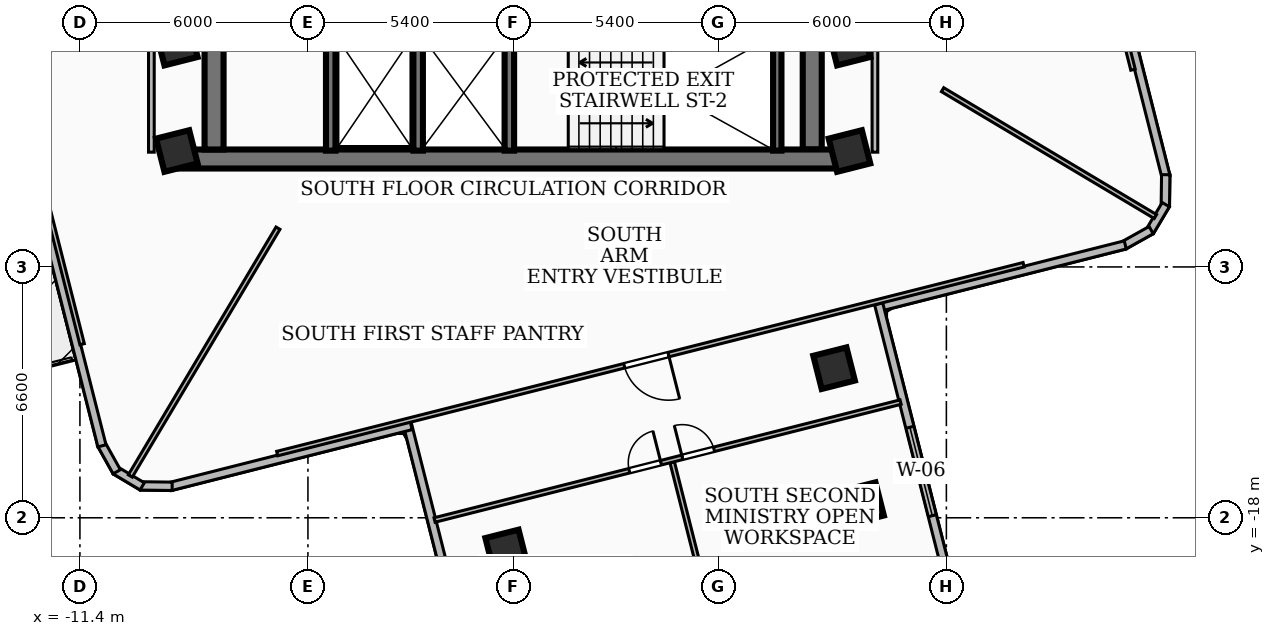
"""IFC4 building model, lengths in metres.
Left out: names, types, materials, properties, quantities, classifications, styles, units other than length and angle.
Written with IfcOpenShell. Run it as: python <this file> out.ifc"""

import sys

from ifc_helpers import new_model, si_unit, direction, frame, frame_2d, origin, origin_2d, place, context, subcontext, project, spatial, rectangle, extrude, element, fill, save


model = new_model("IFC4")
c1 = context("Model", 3, precision=1e-05, world=origin(), true_north=direction((0.0, 1.0)))
c2 = subcontext(c1, "Body", "Model", "MODEL_VIEW")
j1 = project(units=[si_unit("LENGTHUNIT", "METRE"), si_unit("PLANEANGLEUNIT", "RADIAN")], contexts=[c1])
p1 = place(None, origin())
s1 = spatial("IfcSite", under=j1, at=p1, CompositionType="ELEMENT")
p2 = place(p1, origin())
s2 = spatial("IfcBuilding", under=s1, at=p2, CompositionType="ELEMENT")
p3 = place(p2, frame((0.0, 0.0, 130.68)))
s3 = spatial("IfcBuildingStorey", under=s2, at=p3, CompositionType="ELEMENT", Elevation=130.68)
p4 = place(p3, frame((8.78, -8.56, 0.0), z_axis=(0.0, 0.0, 1.0), x_axis=(-1.0, 0.0, 0.0)))
e1 = element("IfcWall", 1, at=p4, inside=s3, PredefinedType="SHEAR", context=c2, shape_type="SweptSolid", body=[
    extrude(rectangle(XDim=17.56, YDim=0.5, at=frame_2d((8.78, 0.0))), origin(), (0.0, 0.0, 1.0), 3.32),
])
for number, where, z_axis, x_axis in (
    (2, (-7.87, -8.31, 0.0), (0.0, 0.0, 1.0), (0.0, 1.0, 0.0)),
    (3, (7.87, -2.0, 0.0), (0.0, 0.0, 1.0), (0.0, -1.0, 0.0)),
):
    element("IfcWall", number, at=place(p3, frame(where, z_axis=z_axis, x_axis=x_axis)), inside=s3, PredefinedType="SHEAR", context=c2, shape_type="SweptSolid", body=[
        extrude(rectangle(XDim=6.31, YDim=0.5, at=frame_2d((3.155, 0.0))), origin(), (0.0, 0.0, 1.0), 3.32),
    ])
p5 = place(p3, frame((6.95, -8.34, 0.0), z_axis=(0.0, 0.0, 1.0), x_axis=(0.0, 1.0, 0.0)))
e4 = element("IfcWall", 4, at=p5, inside=s3, PredefinedType="SOLIDWALL", context=c2, shape_type="SweptSolid", body=[
    extrude(rectangle(XDim=3.06, YDim=0.22, at=frame_2d((1.53, 0.0))), origin(), (0.0, 0.0, 1.0), 3.32),
])
for number, where, z_axis, x_axis in (
    (5, (-0.1, -8.34, 0.0), (0.0, 0.0, 1.0), (0.0, 1.0, 0.0)),
    (6, (-2.5, -8.34, 0.0), (0.0, 0.0, 1.0), (0.0, 1.0, 0.0)),
    (7, (-4.8, -8.34, 0.0), (0.0, 0.0, 1.0), (0.0, 1.0, 0.0)),
):
    element("IfcWall", number, at=place(p3, frame(where, z_axis=z_axis, x_axis=x_axis)), inside=s3, PredefinedType="SOLIDWALL", context=c2, shape_type="SweptSolid", body=[
        extrude(rectangle(XDim=3.04, YDim=0.25, at=frame_2d((1.52, 0.0))), origin(), (0.0, 0.0, 1.0), 3.32),
    ])
for number, where, z_axis, x_axis in (
    (8, (-8.85, -5.55, 0.0), (0.0, 0.0, 1.0), (0.969, 0.245, 0.0)),
    (9, (8.85, -5.55, 0.0), (0.0, 0.0, 1.0), (0.969, 0.245, 0.0)),
    (10, (8.85, -8.35, 0.0), (0.0, 0.0, 1.0), (0.969, 0.245, 0.0)),
    (11, (-8.85, -8.35, 0.0), (0.0, 0.0, 1.0), (0.969, 0.245, 0.0)),
    (12, (-0.183, -18.86, 0.0), (0.0, 0.0, 1.0), (0.969, 0.245, 0.0)),
    (13, (8.445, -14.064, 0.0), (0.0, 0.0, 1.0), (0.969, 0.245, 0.0)),
    (14, (9.208, -17.615, 0.0), (0.0, 0.0, 1.0), (0.969, 0.245, 0.0)),
):
    element("IfcColumn", number, at=place(p3, frame(where, z_axis=z_axis, x_axis=x_axis)), inside=s3, PredefinedType="COLUMN", context=c2, shape_type="SweptSolid", body=[
        extrude(rectangle(XDim=0.9, YDim=0.9, at=origin_2d()), origin(), (0.0, 0.0, 1.0), 3.6),
    ])
p6 = place(p3, frame((15.574, -2.684, 0.0), z_axis=(0.0, 0.0, 1.0), x_axis=(0.245346347134, -0.969435490349, 0.0)))
e15 = element("IfcWall", 15, at=p6, inside=s3, PredefinedType="SOLIDWALL", context=c2, shape_type="SweptSolid", body=[
    extrude(rectangle(XDim=6.538, YDim=0.22, at=frame_2d((3.269, 0.0))), origin(), (0.0, 0.0, 1.0), 3.32),
])
p7 = place(p3, frame((17.172, -8.973, 0.0), z_axis=(0.0, 0.0, 1.0), x_axis=(-0.013464821393, -0.999909345183, 0.0)))
e16 = element("IfcWall", 16, at=p7, inside=s3, PredefinedType="SOLIDWALL", context=c2, shape_type="SweptSolid", body=[
    extrude(rectangle(XDim=0.834, YDim=0.22, at=frame_2d((0.417, 0.0))), origin(), (0.0, 0.0, 1.0), 3.32),
])
p8 = place(p3, frame((17.174, -9.761, 0.0), z_axis=(0.0, 0.0, 1.0), x_axis=(-0.512960801038, -0.858412031951, 0.0)))
e17 = element("IfcWall", 17, at=p8, inside=s3, PredefinedType="SOLIDWALL", context=c2, shape_type="SweptSolid", body=[
    extrude(rectangle(XDim=0.819, YDim=0.22, at=frame_2d((0.41, 0.0))), origin(), (0.0, 0.0, 1.0), 3.32),
])
p9 = place(p3, frame((16.789, -10.431, 0.0), z_axis=(0.0, 0.0, 1.0), x_axis=(-0.872870149311, -0.487952561671, 0.0)))
e18 = element("IfcWall", 18, at=p9, inside=s3, PredefinedType="SOLIDWALL", context=c2, shape_type="SweptSolid", body=[
    extrude(rectangle(XDim=0.834, YDim=0.22, at=frame_2d((0.417, 0.0))), origin(), (0.0, 0.0, 1.0), 3.32),
])
p10 = place(p3, frame((16.107, -10.82, 0.0), z_axis=(0.0, 0.0, 1.0), x_axis=(-0.969443674581, -0.245314006561, 0.0)))
e19 = element("IfcWall", 19, at=p10, inside=s3, PredefinedType="SOLIDWALL", context=c2, shape_type="SweptSolid", body=[
    extrude(rectangle(XDim=6.759, YDim=0.22, at=frame_2d((3.379, 0.0))), origin(), (0.0, 0.0, 1.0), 3.32),
])
p11 = place(p3, frame((9.618, -12.371, 0.0), z_axis=(0.0, 0.0, 1.0), x_axis=(0.245401293719, -0.969421582719, 0.0)))
e20 = element("IfcWall", 20, at=p11, inside=s3, PredefinedType="SOLIDWALL", context=c2, shape_type="SweptSolid", body=[
    extrude(rectangle(XDim=9.458, YDim=0.22, at=frame_2d((4.729, 0.0))), origin(), (0.0, 0.0, 1.0), 3.32),
])
p12 = place(p11, frame((3.35, 0.0, 0.85)))
e21 = element("IfcOpeningElement", 21, at=p12, cuts=e20, PredefinedType="OPENING", context=c2, shape_type="SweptSolid", body=[
    extrude(rectangle(XDim=2.4, YDim=1.85, at=frame_2d((1.2, 0.925))), frame((0.0, 0.12, 0.0), z_axis=(0.0, -1.0, 0.0), x_axis=(1.0, 0.0, 0.0)), (0.0, 0.0, 1.0), 0.24),
])
p13 = place(p3, frame((-0.47, -24.68, 0.0), z_axis=(0.0, 0.0, 1.0), x_axis=(-0.245401293719, 0.969421582719, 0.0)))
e22 = element("IfcWall", 22, at=p13, inside=s3, PredefinedType="SOLIDWALL", context=c2, shape_type="SweptSolid", body=[
    extrude(rectangle(XDim=9.458, YDim=0.22, at=frame_2d((4.729, 0.0))), origin(), (0.0, 0.0, 1.0), 2.55),
])
p14 = place(p3, frame((-2.684, -15.574, 0.0), z_axis=(0.0, 0.0, 1.0), x_axis=(-0.969435490349, -0.245346347134, 0.0)))
e23 = element("IfcWall", 23, at=p14, inside=s3, PredefinedType="SOLIDWALL", context=c2, shape_type="SweptSolid", body=[
    extrude(rectangle(XDim=6.538, YDim=0.22, at=frame_2d((3.269, 0.0))), origin(), (0.0, 0.0, 1.0), 2.55),
])
p15 = place(p3, frame((-8.973, -17.172, 0.0), z_axis=(0.0, 0.0, 1.0), x_axis=(-0.999909345183, 0.013464821393, 0.0)))
e24 = element("IfcWall", 24, at=p15, inside=s3, PredefinedType="SOLIDWALL", context=c2, shape_type="SweptSolid", body=[
    extrude(rectangle(XDim=0.834, YDim=0.22, at=frame_2d((0.417, 0.0))), origin(), (0.0, 0.0, 1.0), 3.32),
])
p16 = place(p3, frame((-9.761, -17.174, 0.0), z_axis=(0.0, 0.0, 1.0), x_axis=(-0.858412031951, 0.512960801038, 0.0)))
e25 = element("IfcWall", 25, at=p16, inside=s3, PredefinedType="SOLIDWALL", context=c2, shape_type="SweptSolid", body=[
    extrude(rectangle(XDim=0.819, YDim=0.22, at=frame_2d((0.41, 0.0))), origin(), (0.0, 0.0, 1.0), 3.32),
])
p17 = place(p3, frame((-10.431, -16.789, 0.0), z_axis=(0.0, 0.0, 1.0), x_axis=(-0.487952561671, 0.872870149311, 0.0)))
e26 = element("IfcWall", 26, at=p17, inside=s3, PredefinedType="SOLIDWALL", context=c2, shape_type="SweptSolid", body=[
    extrude(rectangle(XDim=0.834, YDim=0.22, at=frame_2d((0.417, 0.0))), origin(), (0.0, 0.0, 1.0), 3.32),
])
p18 = place(p3, frame((-10.82, -16.107, 0.0), z_axis=(0.0, 0.0, 1.0), x_axis=(-0.245314006561, 0.969443674581, 0.0)))
e27 = element("IfcWall", 27, at=p18, inside=s3, PredefinedType="SOLIDWALL", context=c2, shape_type="SweptSolid", body=[
    extrude(rectangle(XDim=6.759, YDim=0.22, at=frame_2d((3.379, 0.0))), origin(), (0.0, 0.0, 1.0), 3.32),
])
for number, where, z_axis, x_axis in (
    (28, (-9.52, -8.38, 0.0), (0.0, 0.0, 1.0), (0.0, 1.0, 0.0)),
    (29, (9.52, -8.38, 0.0), (0.0, 0.0, 1.0), (0.0, 1.0, 0.0)),
):
    element("IfcWall", number, at=place(p3, frame(where, z_axis=z_axis, x_axis=x_axis)), inside=s3, PredefinedType="PARTITIONING", context=c2, shape_type="SweptSolid", body=[
        extrude(rectangle(XDim=6.63, YDim=0.15, at=frame_2d((3.315, 0.0))), origin(), (0.0, 0.0, 1.0), 2.55),
    ])
p19 = place(p3, frame((-6.188, -10.38, 0.0), z_axis=(0.0, 0.0, 1.0), x_axis=(-0.511972353143, -0.859001926434, 0.0)))
e30 = element("IfcWall", 30, at=p19, inside=s3, PredefinedType="PARTITIONING", context=c2, shape_type="SweptSolid", body=[
    extrude(rectangle(XDim=7.59, YDim=0.12, at=frame_2d((3.795, 0.0))), origin(), (0.0, 0.0, 1.0), 2.55),
])
p20 = place(p3, frame((11.3, -6.736, 0.0), z_axis=(0.0, 0.0, 1.0), x_axis=(0.858979599017, -0.512009812868, 0.0)))
e31 = element("IfcWall", 31, at=p20, inside=s3, PredefinedType="PARTITIONING", context=c2, shape_type="SweptSolid", body=[
    extrude(rectangle(XDim=6.519, YDim=0.12, at=frame_2d((3.26, 0.0))), origin(), (0.0, 0.0, 1.0), 3.32),
])
p21 = place(p3, frame((11.342, 13.433, 0.0), z_axis=(0.0, 0.0, 1.0), x_axis=(0.24525085526, -0.969459652587, 0.0)))
e32 = element("IfcWall", 32, at=p21, inside=s3, PredefinedType="PARTITIONING", context=c2, shape_type="SweptSolid", body=[
    extrude(rectangle(XDim=20.261, YDim=0.12, at=frame_2d((10.13, 0.0))), origin(), (0.0, 0.0, 1.0), 2.55),
])
p22 = place(p21, frame((9.64, 0.0, 0.0)))
e33 = element("IfcOpeningElement", 33, at=p22, cuts=e32, PredefinedType="OPENING", context=c2, shape_type="SweptSolid", body=[
    extrude(rectangle(XDim=1.2, YDim=2.1, at=frame_2d((0.6, 1.05))), frame((0.0, 0.07, 0.0), z_axis=(0.0, -1.0, 0.0), x_axis=(1.0, 0.0, 0.0)), (0.0, 0.0, 1.0), 0.14),
])
p23 = place(p3, frame((-11.342, -13.433, 0.0), z_axis=(0.0, 0.0, 1.0), x_axis=(-0.24525085526, 0.969459652587, 0.0)))
e34 = element("IfcWall", 34, at=p23, inside=s3, PredefinedType="PARTITIONING", context=c2, shape_type="SweptSolid", body=[
    extrude(rectangle(XDim=20.261, YDim=0.12, at=frame_2d((10.13, 0.0))), origin(), (0.0, 0.0, 1.0), 2.55),
])
p24 = place(p23, frame((9.64, 0.0, 0.0)))
e35 = element("IfcOpeningElement", 35, at=p24, cuts=e34, PredefinedType="OPENING", context=c2, shape_type="SweptSolid", body=[
    extrude(rectangle(XDim=1.2, YDim=2.1, at=frame_2d((0.6, 1.05))), frame((0.0, 0.07, 0.0), z_axis=(0.0, -1.0, 0.0), x_axis=(1.0, 0.0, 0.0)), (0.0, 0.0, 1.0), 0.14),
])
p25 = place(p3, frame((13.433, -11.342, 0.0), z_axis=(0.0, 0.0, 1.0), x_axis=(-0.969459652587, -0.24525085526, 0.0)))
e36 = element("IfcWall", 36, at=p25, inside=s3, PredefinedType="PARTITIONING", context=c2, shape_type="SweptSolid", body=[
    extrude(rectangle(XDim=20.261, YDim=0.12, at=frame_2d((10.13, 0.0))), origin(), (0.0, 0.0, 1.0), 2.55),
])
p26 = place(p25, frame((9.64, 0.0, 0.0)))
e37 = element("IfcOpeningElement", 37, at=p26, cuts=e36, PredefinedType="OPENING", context=c2, shape_type="SweptSolid", body=[
    extrude(rectangle(XDim=1.2, YDim=2.1, at=frame_2d((0.6, 1.05))), frame((0.0, 0.07, 0.0), z_axis=(0.0, -1.0, 0.0), x_axis=(1.0, 0.0, 0.0)), (0.0, 0.0, 1.0), 0.14),
])
p27 = place(p3, frame((4.185, -16.539, 0.0), z_axis=(0.0, 0.0, 1.0), x_axis=(0.245296506438, -0.969448102752, 0.0)))
e38 = element("IfcWall", 38, at=p27, inside=s3, PredefinedType="PARTITIONING", context=c2, shape_type="SweptSolid", body=[
    extrude(rectangle(XDim=4.68, YDim=0.12, at=frame_2d((2.34, 0.0))), origin(), (0.0, 0.0, 1.0), 2.7),
])
p28 = place(p3, frame((-2.068, -18.059, 0.0), z_axis=(0.0, 0.0, 1.0), x_axis=(0.969446010802, 0.245304773986, 0.0)))
e39 = element("IfcWall", 39, at=p28, inside=s3, PredefinedType="PARTITIONING", context=c2, shape_type="SweptSolid", body=[
    extrude(rectangle(XDim=12.65, YDim=0.12, at=frame_2d((6.325, 0.0))), origin(), (0.0, 0.0, 1.0), 2.55),
])
p29 = place(p28, frame((5.285, 0.0, 0.0)))
e40 = element("IfcOpeningElement", 40, at=p29, cuts=e39, PredefinedType="OPENING", context=c2, shape_type="SweptSolid", body=[
    extrude(rectangle(XDim=0.86, YDim=2.04, at=frame_2d((0.43, 1.02))), frame((0.0, 0.07, 0.0), z_axis=(0.0, -1.0, 0.0), x_axis=(1.0, 0.0, 0.0)), (0.0, 0.0, 1.0), 0.14),
])
p30 = place(p28, frame((6.725, 0.0, 0.0)))
e41 = element("IfcOpeningElement", 41, at=p30, cuts=e39, PredefinedType="OPENING", context=c2, shape_type="SweptSolid", body=[
    extrude(rectangle(XDim=0.86, YDim=2.04, at=frame_2d((0.43, 1.02))), frame((0.0, 0.07, 0.0), z_axis=(0.0, -1.0, 0.0), x_axis=(1.0, 0.0, 0.0)), (0.0, 0.0, 1.0), 0.14),
])
p31 = place(p12, origin())
e42 = element("IfcWindow", 42, at=p31, inside=s3, PartitioningType="SINGLE_PANEL", PredefinedType="WINDOW", context=c2, shape_type="SweptSolid", body=[
    extrude(rectangle(XDim=2.4, YDim=1.85, at=frame_2d((1.2, 0.925))), frame((0.0, 0.03, 0.0), z_axis=(0.0, -1.0, 0.0), x_axis=(1.0, 0.0, 0.0)), (0.0, 0.0, 1.0), 0.06),
])
fill(e21, e42)
p32 = place(p26, origin())
e43 = element("IfcDoor", 43, at=p32, inside=s3, OperationType="SINGLE_SWING_LEFT", PredefinedType="DOOR", context=c2, shape_type="SweptSolid", body=[
    extrude(rectangle(XDim=1.2, YDim=2.1, at=frame_2d((0.6, 1.05))), frame((0.0, 0.025, 0.0), z_axis=(0.0, -1.0, 0.0), x_axis=(1.0, 0.0, 0.0)), (0.0, 0.0, 1.0), 0.05),
])
fill(e37, e43)
p33 = place(p29, origin())
e44 = element("IfcDoor", 44, at=p33, inside=s3, OperationType="SINGLE_SWING_RIGHT", PredefinedType="DOOR", context=c2, shape_type="SweptSolid", body=[
    extrude(rectangle(XDim=0.86, YDim=2.04, at=frame_2d((0.43, 1.02))), frame((0.0, 0.025, 0.0), z_axis=(0.0, -1.0, 0.0), x_axis=(1.0, 0.0, 0.0)), (0.0, 0.0, 1.0), 0.05),
])
fill(e40, e44)
p34 = place(p30, origin())
e45 = element("IfcDoor", 45, at=p34, inside=s3, OperationType="SINGLE_SWING_LEFT", PredefinedType="DOOR", context=c2, shape_type="SweptSolid", body=[
    extrude(rectangle(XDim=0.86, YDim=2.04, at=frame_2d((0.43, 1.02))), frame((0.0, 0.025, 0.0), z_axis=(0.0, -1.0, 0.0), x_axis=(1.0, 0.0, 0.0)), (0.0, 0.0, 1.0), 0.05),
])
fill(e41, e45)
save(model, sys.argv[1])
